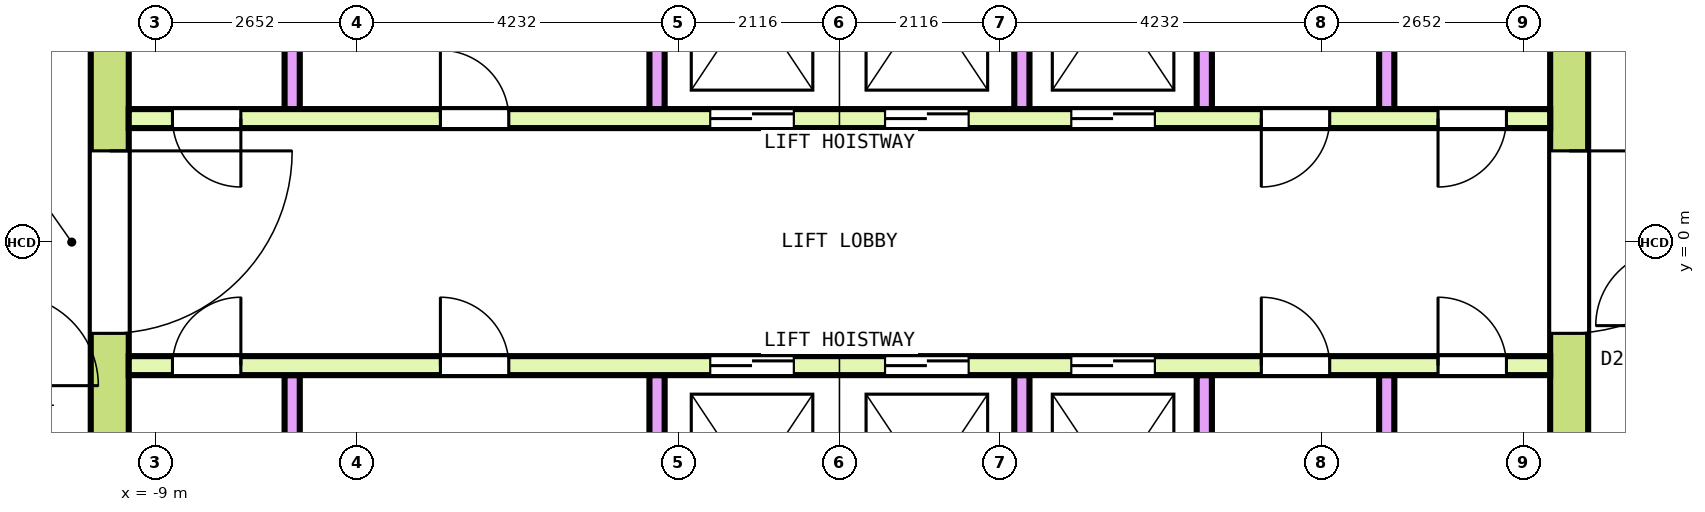
"""IFC4 building model, lengths in metres.
Left out: names, types, materials, properties, quantities, classifications, styles, units other than length and angle.
Written with IfcOpenShell. Run it as: python <this file> out.ifc"""

import sys

from ifc_helpers import new_model, si_unit, direction, frame, frame_2d, origin, place, context, subcontext, project, spatial, rectangle, extrude, element, fill, save


model = new_model("IFC4")
c1 = context("Model", 3, precision=1e-05, world=origin(), true_north=direction((0.0, 1.0)))
c2 = subcontext(c1, "Body", "Model", "MODEL_VIEW")
j1 = project(units=[si_unit("LENGTHUNIT", "METRE"), si_unit("PLANEANGLEUNIT", "RADIAN")], contexts=[c1])
p1 = place(None, origin())
s1 = spatial("IfcSite", under=j1, at=p1, CompositionType="ELEMENT")
p2 = place(p1, origin())
s2 = spatial("IfcBuilding", under=s1, at=p2, CompositionType="ELEMENT")
p3 = place(p2, frame((0.0, 0.0, 283.0)))
s3 = spatial("IfcBuildingStorey", under=s2, at=p3, CompositionType="ELEMENT", Elevation=283.0)
p4 = place(p3, frame((-9.6, -7.85, 0.0), z_axis=(0.0, 0.0, 1.0), x_axis=(0.0, 1.0, 0.0)))
e1 = element("IfcWall", 1, at=p4, inside=s3, PredefinedType="SHEAR", context=c2, shape_type="SweptSolid", body=[
    extrude(rectangle(XDim=15.7, YDim=0.5, at=frame_2d((7.85, 0.0))), origin(), (0.0, 0.0, 1.0), 3.7),
])
p5 = place(p4, frame((6.65, 0.0, 0.0)))
e2 = element("IfcOpeningElement", 2, at=p5, cuts=e1, PredefinedType="OPENING", context=c2, shape_type="SweptSolid", body=[
    extrude(rectangle(XDim=2.4, YDim=2.1, at=frame_2d((1.2, 1.05))), frame((0.0, 0.26, 0.0), z_axis=(0.0, -1.0, 0.0), x_axis=(1.0, 0.0, 0.0)), (0.0, 0.0, 1.0), 0.52),
])
p6 = place(p4, frame((13.55, 0.0, 0.0)))
e3 = element("IfcOpeningElement", 3, at=p6, cuts=e1, PredefinedType="OPENING", context=c2, shape_type="SweptSolid", body=[
    extrude(rectangle(XDim=1.2, YDim=2.1, at=frame_2d((0.6, 1.05))), frame((0.0, 0.26, 0.0), z_axis=(0.0, -1.0, 0.0), x_axis=(1.0, 0.0, 0.0)), (0.0, 0.0, 1.0), 0.52),
])
p7 = place(p4, frame((0.95, 0.0, 0.0)))
e4 = element("IfcOpeningElement", 4, at=p7, cuts=e1, PredefinedType="OPENING", context=c2, shape_type="SweptSolid", body=[
    extrude(rectangle(XDim=1.2, YDim=2.1, at=frame_2d((0.6, 1.05))), frame((0.0, 0.26, 0.0), z_axis=(0.0, -1.0, 0.0), x_axis=(1.0, 0.0, 0.0)), (0.0, 0.0, 1.0), 0.52),
])
p8 = place(p3, frame((9.6, -7.85, 0.0), z_axis=(0.0, 0.0, 1.0), x_axis=(0.0, 1.0, 0.0)))
e5 = element("IfcWall", 5, at=p8, inside=s3, PredefinedType="SHEAR", context=c2, shape_type="SweptSolid", body=[
    extrude(rectangle(XDim=15.7, YDim=0.5, at=frame_2d((7.85, 0.0))), origin(), (0.0, 0.0, 1.0), 3.7),
])
p9 = place(p8, frame((6.65, 0.0, 0.0)))
e6 = element("IfcOpeningElement", 6, at=p9, cuts=e5, PredefinedType="OPENING", context=c2, shape_type="SweptSolid", body=[
    extrude(rectangle(XDim=2.4, YDim=2.1, at=frame_2d((1.2, 1.05))), frame((0.0, 0.26, 0.0), z_axis=(0.0, -1.0, 0.0), x_axis=(1.0, 0.0, 0.0)), (0.0, 0.0, 1.0), 0.52),
])
p10 = place(p8, frame((13.55, 0.0, 0.0)))
e7 = element("IfcOpeningElement", 7, at=p10, cuts=e5, PredefinedType="OPENING", context=c2, shape_type="SweptSolid", body=[
    extrude(rectangle(XDim=1.2, YDim=2.1, at=frame_2d((0.6, 1.05))), frame((0.0, 0.26, 0.0), z_axis=(0.0, -1.0, 0.0), x_axis=(1.0, 0.0, 0.0)), (0.0, 0.0, 1.0), 0.52),
])
p11 = place(p8, frame((1.05, 0.0, 0.0)))
e8 = element("IfcOpeningElement", 8, at=p11, cuts=e5, PredefinedType="OPENING", context=c2, shape_type="SweptSolid", body=[
    extrude(rectangle(XDim=1.0, YDim=2.1, at=frame_2d((0.5, 1.05))), frame((0.0, 0.26, 0.0), z_axis=(0.0, -1.0, 0.0), x_axis=(1.0, 0.0, 0.0)), (0.0, 0.0, 1.0), 0.52),
])
p12 = place(p3, frame((-9.35, 1.625, 0.0), z_axis=(0.0, 0.0, 1.0), x_axis=(1.0, 0.0, 0.0)))
e9 = element("IfcWall", 9, at=p12, inside=s3, PredefinedType="SOLIDWALL", context=c2, shape_type="SweptSolid", body=[
    extrude(rectangle(XDim=18.7, YDim=0.25, at=frame_2d((9.35, 0.0))), origin(), (0.0, 0.0, 1.0), 3.7),
])
p13 = place(p12, frame((7.65, 0.0, 0.0)))
e10 = element("IfcOpeningElement", 10, at=p13, cuts=e9, PredefinedType="OPENING", context=c2, shape_type="SweptSolid", body=[
    extrude(rectangle(XDim=1.1, YDim=2.1, at=frame_2d((0.55, 1.05))), frame((0.0, 0.135, 0.0), z_axis=(0.0, -1.0, 0.0), x_axis=(1.0, 0.0, 0.0)), (0.0, 0.0, 1.0), 0.27),
])
p14 = place(p12, frame((9.95, 0.0, 0.0)))
e11 = element("IfcOpeningElement", 11, at=p14, cuts=e9, PredefinedType="OPENING", context=c2, shape_type="SweptSolid", body=[
    extrude(rectangle(XDim=1.1, YDim=2.1, at=frame_2d((0.55, 1.05))), frame((0.0, 0.135, 0.0), z_axis=(0.0, -1.0, 0.0), x_axis=(1.0, 0.0, 0.0)), (0.0, 0.0, 1.0), 0.27),
])
p15 = place(p12, frame((12.4, 0.0, 0.0)))
e12 = element("IfcOpeningElement", 12, at=p15, cuts=e9, PredefinedType="OPENING", context=c2, shape_type="SweptSolid", body=[
    extrude(rectangle(XDim=1.1, YDim=2.1, at=frame_2d((0.55, 1.05))), frame((0.0, 0.135, 0.0), z_axis=(0.0, -1.0, 0.0), x_axis=(1.0, 0.0, 0.0)), (0.0, 0.0, 1.0), 0.27),
])
p16 = place(p12, frame((0.575, 0.0, 0.0)))
e13 = element("IfcOpeningElement", 13, at=p16, cuts=e9, PredefinedType="OPENING", context=c2, shape_type="SweptSolid", body=[
    extrude(rectangle(XDim=0.9, YDim=2.1, at=frame_2d((0.45, 1.05))), frame((0.0, 0.135, 0.0), z_axis=(0.0, -1.0, 0.0), x_axis=(1.0, 0.0, 0.0)), (0.0, 0.0, 1.0), 0.27),
])
p17 = place(p12, frame((4.1, 0.0, 0.0)))
e14 = element("IfcOpeningElement", 14, at=p17, cuts=e9, PredefinedType="OPENING", context=c2, shape_type="SweptSolid", body=[
    extrude(rectangle(XDim=0.9, YDim=2.1, at=frame_2d((0.45, 1.05))), frame((0.0, 0.135, 0.0), z_axis=(0.0, -1.0, 0.0), x_axis=(1.0, 0.0, 0.0)), (0.0, 0.0, 1.0), 0.27),
])
p18 = place(p12, frame((14.9, 0.0, 0.0)))
e15 = element("IfcOpeningElement", 15, at=p18, cuts=e9, PredefinedType="OPENING", context=c2, shape_type="SweptSolid", body=[
    extrude(rectangle(XDim=0.9, YDim=2.1, at=frame_2d((0.45, 1.05))), frame((0.0, 0.135, 0.0), z_axis=(0.0, -1.0, 0.0), x_axis=(1.0, 0.0, 0.0)), (0.0, 0.0, 1.0), 0.27),
])
p19 = place(p12, frame((17.225, 0.0, 0.0)))
e16 = element("IfcOpeningElement", 16, at=p19, cuts=e9, PredefinedType="OPENING", context=c2, shape_type="SweptSolid", body=[
    extrude(rectangle(XDim=0.9, YDim=2.1, at=frame_2d((0.45, 1.05))), frame((0.0, 0.135, 0.0), z_axis=(0.0, -1.0, 0.0), x_axis=(1.0, 0.0, 0.0)), (0.0, 0.0, 1.0), 0.27),
])
for number, where, z_axis, x_axis in (
    (17, (-7.2, 1.75, 0.0), (0.0, 0.0, 1.0), (0.0, 1.0, 0.0)),
    (18, (-2.4, 1.75, 0.0), (0.0, 0.0, 1.0), (0.0, 1.0, 0.0)),
    (19, (2.4, 1.75, 0.0), (0.0, 0.0, 1.0), (0.0, 1.0, 0.0)),
    (20, (4.8, 1.75, 0.0), (0.0, 0.0, 1.0), (0.0, 1.0, 0.0)),
    (21, (7.2, 1.75, 0.0), (0.0, 0.0, 1.0), (0.0, 1.0, 0.0)),
):
    element("IfcWall", number, at=place(p3, frame(where, z_axis=z_axis, x_axis=x_axis)), inside=s3, PredefinedType="SOLIDWALL", context=c2, shape_type="SweptSolid", body=[
        extrude(rectangle(XDim=2.9, YDim=0.2, at=frame_2d((1.45, 0.0))), origin(), (0.0, 0.0, 1.0), 3.7),
    ])
p20 = place(p3, frame((-9.35, -1.625, 0.0), z_axis=(0.0, 0.0, 1.0), x_axis=(1.0, 0.0, 0.0)))
e22 = element("IfcWall", 22, at=p20, inside=s3, PredefinedType="SOLIDWALL", context=c2, shape_type="SweptSolid", body=[
    extrude(rectangle(XDim=18.7, YDim=0.25, at=frame_2d((9.35, 0.0))), origin(), (0.0, 0.0, 1.0), 3.7),
])
p21 = place(p20, frame((7.65, 0.0, 0.0)))
e23 = element("IfcOpeningElement", 23, at=p21, cuts=e22, PredefinedType="OPENING", context=c2, shape_type="SweptSolid", body=[
    extrude(rectangle(XDim=1.1, YDim=2.1, at=frame_2d((0.55, 1.05))), frame((0.0, 0.135, 0.0), z_axis=(0.0, -1.0, 0.0), x_axis=(1.0, 0.0, 0.0)), (0.0, 0.0, 1.0), 0.27),
])
p22 = place(p20, frame((9.95, 0.0, 0.0)))
e24 = element("IfcOpeningElement", 24, at=p22, cuts=e22, PredefinedType="OPENING", context=c2, shape_type="SweptSolid", body=[
    extrude(rectangle(XDim=1.1, YDim=2.1, at=frame_2d((0.55, 1.05))), frame((0.0, 0.135, 0.0), z_axis=(0.0, -1.0, 0.0), x_axis=(1.0, 0.0, 0.0)), (0.0, 0.0, 1.0), 0.27),
])
p23 = place(p20, frame((12.4, 0.0, 0.0)))
e25 = element("IfcOpeningElement", 25, at=p23, cuts=e22, PredefinedType="OPENING", context=c2, shape_type="SweptSolid", body=[
    extrude(rectangle(XDim=1.1, YDim=2.1, at=frame_2d((0.55, 1.05))), frame((0.0, 0.135, 0.0), z_axis=(0.0, -1.0, 0.0), x_axis=(1.0, 0.0, 0.0)), (0.0, 0.0, 1.0), 0.27),
])
p24 = place(p20, frame((0.575, 0.0, 0.0)))
e26 = element("IfcOpeningElement", 26, at=p24, cuts=e22, PredefinedType="OPENING", context=c2, shape_type="SweptSolid", body=[
    extrude(rectangle(XDim=0.9, YDim=2.1, at=frame_2d((0.45, 1.05))), frame((0.0, 0.135, 0.0), z_axis=(0.0, -1.0, 0.0), x_axis=(1.0, 0.0, 0.0)), (0.0, 0.0, 1.0), 0.27),
])
p25 = place(p20, frame((4.1, 0.0, 0.0)))
e27 = element("IfcOpeningElement", 27, at=p25, cuts=e22, PredefinedType="OPENING", context=c2, shape_type="SweptSolid", body=[
    extrude(rectangle(XDim=0.9, YDim=2.1, at=frame_2d((0.45, 1.05))), frame((0.0, 0.135, 0.0), z_axis=(0.0, -1.0, 0.0), x_axis=(1.0, 0.0, 0.0)), (0.0, 0.0, 1.0), 0.27),
])
p26 = place(p20, frame((14.9, 0.0, 0.0)))
e28 = element("IfcOpeningElement", 28, at=p26, cuts=e22, PredefinedType="OPENING", context=c2, shape_type="SweptSolid", body=[
    extrude(rectangle(XDim=0.9, YDim=2.1, at=frame_2d((0.45, 1.05))), frame((0.0, 0.135, 0.0), z_axis=(0.0, -1.0, 0.0), x_axis=(1.0, 0.0, 0.0)), (0.0, 0.0, 1.0), 0.27),
])
p27 = place(p20, frame((17.225, 0.0, 0.0)))
e29 = element("IfcOpeningElement", 29, at=p27, cuts=e22, PredefinedType="OPENING", context=c2, shape_type="SweptSolid", body=[
    extrude(rectangle(XDim=0.9, YDim=2.1, at=frame_2d((0.45, 1.05))), frame((0.0, 0.135, 0.0), z_axis=(0.0, -1.0, 0.0), x_axis=(1.0, 0.0, 0.0)), (0.0, 0.0, 1.0), 0.27),
])
for number, where, z_axis, x_axis in (
    (30, (-7.2, -4.65, 0.0), (0.0, 0.0, 1.0), (0.0, 1.0, 0.0)),
    (31, (-2.4, -4.65, 0.0), (0.0, 0.0, 1.0), (0.0, 1.0, 0.0)),
    (32, (2.4, -4.65, 0.0), (0.0, 0.0, 1.0), (0.0, 1.0, 0.0)),
    (33, (4.8, -4.65, 0.0), (0.0, 0.0, 1.0), (0.0, 1.0, 0.0)),
    (34, (7.2, -4.65, 0.0), (0.0, 0.0, 1.0), (0.0, 1.0, 0.0)),
):
    element("IfcWall", number, at=place(p3, frame(where, z_axis=z_axis, x_axis=x_axis)), inside=s3, PredefinedType="SOLIDWALL", context=c2, shape_type="SweptSolid", body=[
        extrude(rectangle(XDim=2.9, YDim=0.2, at=frame_2d((1.45, 0.0))), origin(), (0.0, 0.0, 1.0), 3.7),
    ])
p28 = place(p13, origin())
e35 = element("IfcDoor", 35, at=p28, inside=s3, OperationType="DOUBLE_DOOR_SLIDING", PredefinedType="DOOR", context=c2, shape_type="SweptSolid", body=[
    extrude(rectangle(XDim=1.1, YDim=2.1, at=frame_2d((0.55, 1.05))), frame((0.0, 0.075, 0.0), z_axis=(0.0, -1.0, 0.0), x_axis=(1.0, 0.0, 0.0)), (0.0, 0.0, 1.0), 0.15),
])
fill(e10, e35)
p29 = place(p14, origin())
e36 = element("IfcDoor", 36, at=p29, inside=s3, OperationType="DOUBLE_DOOR_SLIDING", PredefinedType="DOOR", context=c2, shape_type="SweptSolid", body=[
    extrude(rectangle(XDim=1.1, YDim=2.1, at=frame_2d((0.55, 1.05))), frame((0.0, 0.075, 0.0), z_axis=(0.0, -1.0, 0.0), x_axis=(1.0, 0.0, 0.0)), (0.0, 0.0, 1.0), 0.15),
])
fill(e11, e36)
p30 = place(p15, origin())
e37 = element("IfcDoor", 37, at=p30, inside=s3, OperationType="DOUBLE_DOOR_SLIDING", PredefinedType="DOOR", context=c2, shape_type="SweptSolid", body=[
    extrude(rectangle(XDim=1.1, YDim=2.1, at=frame_2d((0.55, 1.05))), frame((0.0, 0.075, 0.0), z_axis=(0.0, -1.0, 0.0), x_axis=(1.0, 0.0, 0.0)), (0.0, 0.0, 1.0), 0.15),
])
fill(e12, e37)
p31 = place(p21, origin())
e38 = element("IfcDoor", 38, at=p31, inside=s3, OperationType="DOUBLE_DOOR_SLIDING", PredefinedType="DOOR", context=c2, shape_type="SweptSolid", body=[
    extrude(rectangle(XDim=1.1, YDim=2.1, at=frame_2d((0.55, 1.05))), frame((0.0, 0.075, 0.0), z_axis=(0.0, -1.0, 0.0), x_axis=(1.0, 0.0, 0.0)), (0.0, 0.0, 1.0), 0.15),
])
fill(e23, e38)
p32 = place(p22, origin())
e39 = element("IfcDoor", 39, at=p32, inside=s3, OperationType="DOUBLE_DOOR_SLIDING", PredefinedType="DOOR", context=c2, shape_type="SweptSolid", body=[
    extrude(rectangle(XDim=1.1, YDim=2.1, at=frame_2d((0.55, 1.05))), frame((0.0, 0.075, 0.0), z_axis=(0.0, -1.0, 0.0), x_axis=(1.0, 0.0, 0.0)), (0.0, 0.0, 1.0), 0.15),
])
fill(e24, e39)
p33 = place(p23, origin())
e40 = element("IfcDoor", 40, at=p33, inside=s3, OperationType="DOUBLE_DOOR_SLIDING", PredefinedType="DOOR", context=c2, shape_type="SweptSolid", body=[
    extrude(rectangle(XDim=1.1, YDim=2.1, at=frame_2d((0.55, 1.05))), frame((0.0, 0.075, 0.0), z_axis=(0.0, -1.0, 0.0), x_axis=(1.0, 0.0, 0.0)), (0.0, 0.0, 1.0), 0.15),
])
fill(e25, e40)
p34 = place(p5, origin())
e41 = element("IfcDoor", 41, at=p34, inside=s3, OperationType="DOUBLE_DOOR_SINGLE_SWING", PredefinedType="DOOR", context=c2, shape_type="SweptSolid", body=[
    extrude(rectangle(XDim=2.4, YDim=2.1, at=frame_2d((1.2, 1.05))), frame((0.0, 0.2, 0.0), z_axis=(0.0, -1.0, 0.0), x_axis=(1.0, 0.0, 0.0)), (0.0, 0.0, 1.0), 0.4),
])
fill(e2, e41)
p35 = place(p9, origin())
e42 = element("IfcDoor", 42, at=p35, inside=s3, OperationType="DOUBLE_DOOR_SINGLE_SWING", PredefinedType="DOOR", context=c2, shape_type="SweptSolid", body=[
    extrude(rectangle(XDim=2.4, YDim=2.1, at=frame_2d((1.2, 1.05))), frame((0.0, 0.2, 0.0), z_axis=(0.0, -1.0, 0.0), x_axis=(1.0, 0.0, 0.0)), (0.0, 0.0, 1.0), 0.4),
])
fill(e6, e42)
p36 = place(p16, origin())
e43 = element("IfcDoor", 43, at=p36, inside=s3, OperationType="SINGLE_SWING_RIGHT", PredefinedType="DOOR", context=c2, shape_type="SweptSolid", body=[
    extrude(rectangle(XDim=0.9, YDim=2.1, at=frame_2d((0.45, 1.05))), frame((0.0, 0.075, 0.0), z_axis=(0.0, -1.0, 0.0), x_axis=(1.0, 0.0, 0.0)), (0.0, 0.0, 1.0), 0.15),
])
fill(e13, e43)
p37 = place(p17, origin())
e44 = element("IfcDoor", 44, at=p37, inside=s3, OperationType="SINGLE_SWING_LEFT", PredefinedType="DOOR", context=c2, shape_type="SweptSolid", body=[
    extrude(rectangle(XDim=0.9, YDim=2.1, at=frame_2d((0.45, 1.05))), frame((0.0, 0.075, 0.0), z_axis=(0.0, -1.0, 0.0), x_axis=(1.0, 0.0, 0.0)), (0.0, 0.0, 1.0), 0.15),
])
fill(e14, e44)
p38 = place(p18, origin())
e45 = element("IfcDoor", 45, at=p38, inside=s3, OperationType="SINGLE_SWING_RIGHT", PredefinedType="DOOR", context=c2, shape_type="SweptSolid", body=[
    extrude(rectangle(XDim=0.9, YDim=2.1, at=frame_2d((0.45, 1.05))), frame((0.0, 0.075, 0.0), z_axis=(0.0, -1.0, 0.0), x_axis=(1.0, 0.0, 0.0)), (0.0, 0.0, 1.0), 0.15),
])
fill(e15, e45)
p39 = place(p19, origin())
e46 = element("IfcDoor", 46, at=p39, inside=s3, OperationType="SINGLE_SWING_LEFT", PredefinedType="DOOR", context=c2, shape_type="SweptSolid", body=[
    extrude(rectangle(XDim=0.9, YDim=2.1, at=frame_2d((0.45, 1.05))), frame((0.0, 0.075, 0.0), z_axis=(0.0, -1.0, 0.0), x_axis=(1.0, 0.0, 0.0)), (0.0, 0.0, 1.0), 0.15),
])
fill(e16, e46)
p40 = place(p24, origin())
e47 = element("IfcDoor", 47, at=p40, inside=s3, OperationType="SINGLE_SWING_RIGHT", PredefinedType="DOOR", context=c2, shape_type="SweptSolid", body=[
    extrude(rectangle(XDim=0.9, YDim=2.1, at=frame_2d((0.45, 1.05))), frame((0.0, 0.075, 0.0), z_axis=(0.0, -1.0, 0.0), x_axis=(1.0, 0.0, 0.0)), (0.0, 0.0, 1.0), 0.15),
])
fill(e26, e47)
p41 = place(p25, origin())
e48 = element("IfcDoor", 48, at=p41, inside=s3, OperationType="SINGLE_SWING_LEFT", PredefinedType="DOOR", context=c2, shape_type="SweptSolid", body=[
    extrude(rectangle(XDim=0.9, YDim=2.1, at=frame_2d((0.45, 1.05))), frame((0.0, 0.075, 0.0), z_axis=(0.0, -1.0, 0.0), x_axis=(1.0, 0.0, 0.0)), (0.0, 0.0, 1.0), 0.15),
])
fill(e27, e48)
p42 = place(p26, origin())
e49 = element("IfcDoor", 49, at=p42, inside=s3, OperationType="SINGLE_SWING_RIGHT", PredefinedType="DOOR", context=c2, shape_type="SweptSolid", body=[
    extrude(rectangle(XDim=0.9, YDim=2.1, at=frame_2d((0.45, 1.05))), frame((0.0, 0.075, 0.0), z_axis=(0.0, -1.0, 0.0), x_axis=(1.0, 0.0, 0.0)), (0.0, 0.0, 1.0), 0.15),
])
fill(e28, e49)
p43 = place(p27, origin())
e50 = element("IfcDoor", 50, at=p43, inside=s3, OperationType="SINGLE_SWING_LEFT", PredefinedType="DOOR", context=c2, shape_type="SweptSolid", body=[
    extrude(rectangle(XDim=0.9, YDim=2.1, at=frame_2d((0.45, 1.05))), frame((0.0, 0.075, 0.0), z_axis=(0.0, -1.0, 0.0), x_axis=(1.0, 0.0, 0.0)), (0.0, 0.0, 1.0), 0.15),
])
fill(e29, e50)
save(model, sys.argv[1])
